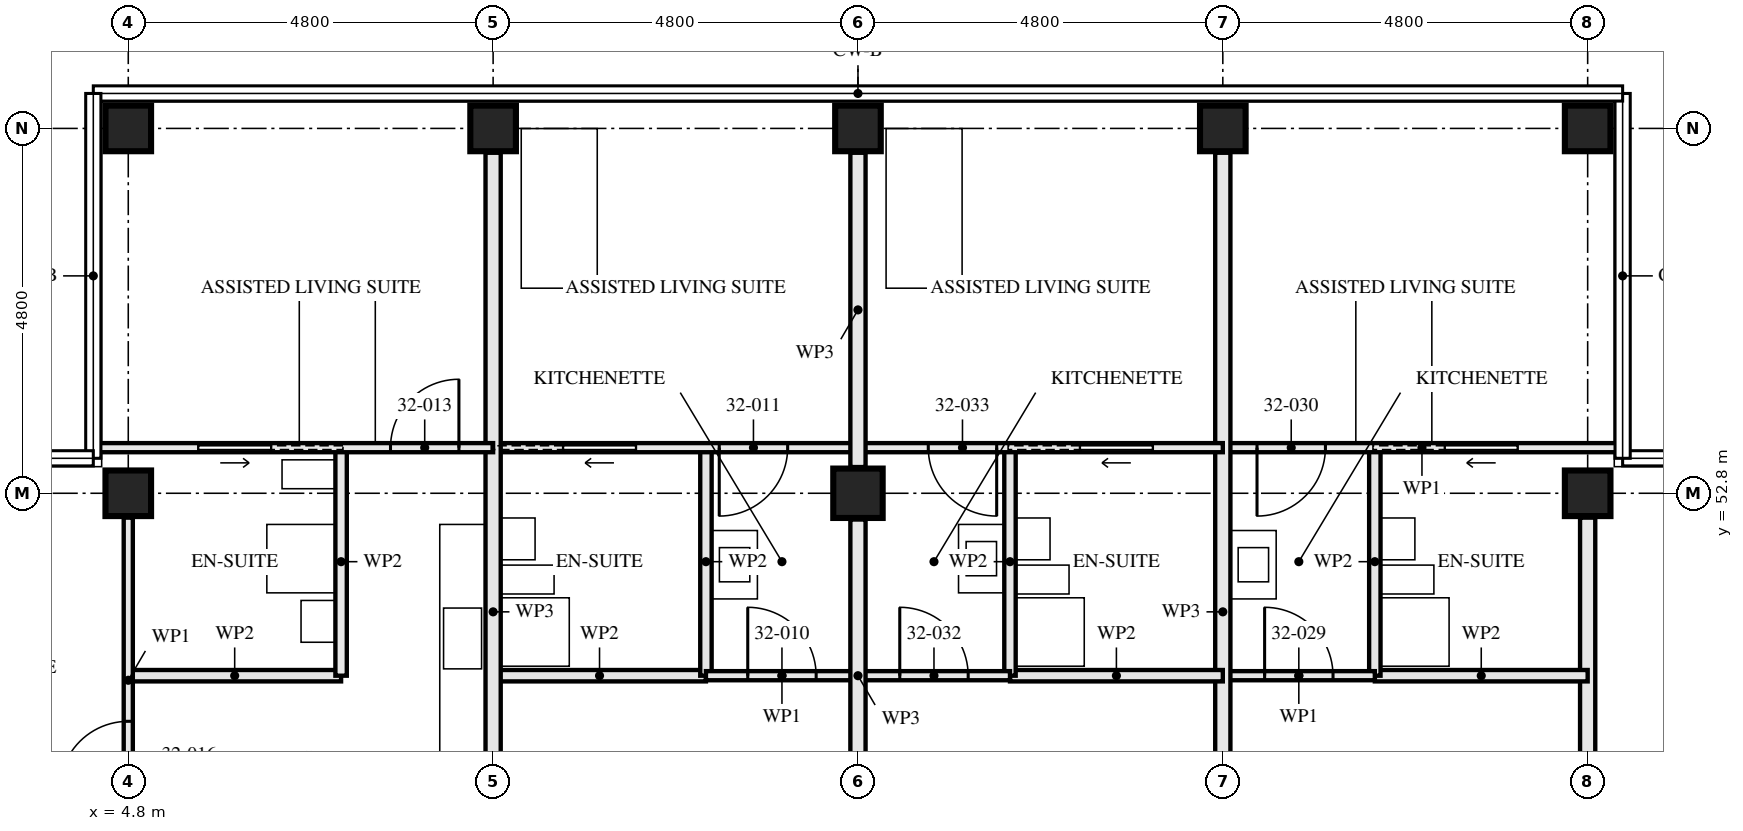
"""IFC4 building model, lengths in metres.
Left out: names, types, materials, properties, quantities, classifications, styles, units other than length and angle.
Written with IfcOpenShell. Run it as: python <this file> out.ifc"""

import sys

from ifc_helpers import new_model, si_unit, direction, frame, frame_2d, origin, origin_2d, place, context, subcontext, project, spatial, rectangle, hollow_rectangle, extrude, element, fill, save


model = new_model("IFC4")
c1 = context("Model", 3, precision=1e-05, world=origin(), true_north=direction((0.0, 1.0)))
c2 = subcontext(c1, "Body", "Model", "MODEL_VIEW")
j1 = project(units=[si_unit("LENGTHUNIT", "METRE"), si_unit("PLANEANGLEUNIT", "RADIAN")], contexts=[c1])
p1 = place(None, origin())
s1 = spatial("IfcSite", under=j1, at=p1, CompositionType="ELEMENT")
p2 = place(p1, origin())
s2 = spatial("IfcBuilding", under=s1, at=p2, CompositionType="ELEMENT")
p3 = place(p2, frame((0.0, 0.0, 119.0)))
s3 = spatial("IfcBuildingStorey", under=s2, at=p3, CompositionType="ELEMENT", Elevation=119.0)
for number, where, z_axis, x_axis in (
    (1, (4.8, 52.8, 0.0), (0.0, 0.0, 1.0), (0.0, 1.0, 0.0)),
    (2, (4.8, 57.6, 0.0), (0.0, 0.0, 1.0), (0.0, 1.0, 0.0)),
    (3, (9.6, 57.6, 0.0), (0.0, 0.0, 1.0), (0.0, 1.0, 0.0)),
):
    element("IfcColumn", number, at=place(p3, frame(where, z_axis=z_axis, x_axis=x_axis)), inside=s3, PredefinedType="COLUMN", context=c2, shape_type="SweptSolid", body=[
        extrude(hollow_rectangle(XDim=0.6, YDim=0.6, WallThickness=0.08, at=origin_2d()), origin(), (0.0, 0.0, 1.0), 3.5),
    ])
p4 = place(p3, frame((14.4, 52.8, 0.0), z_axis=(0.0, 0.0, 1.0), x_axis=(1.0, 0.0, 0.0)))
e4 = element("IfcColumn", 4, at=p4, inside=s3, PredefinedType="COLUMN", context=c2, shape_type="SweptSolid", body=[
    extrude(hollow_rectangle(XDim=0.65, YDim=0.65, WallThickness=0.05, at=origin_2d()), origin(), (0.0, 0.0, 1.0), 3.5),
])
for number, where, z_axis, x_axis in (
    (5, (14.4, 57.6, 0.0), (0.0, 0.0, 1.0), (0.0, 1.0, 0.0)),
    (6, (19.2, 57.6, 0.0), (0.0, 0.0, 1.0), (0.0, 1.0, 0.0)),
    (7, (24.0, 52.8, 0.0), (0.0, 0.0, 1.0), (0.0, 1.0, 0.0)),
    (8, (24.0, 57.6, 0.0), (0.0, 0.0, 1.0), (0.0, 1.0, 0.0)),
):
    element("IfcColumn", number, at=place(p3, frame(where, z_axis=z_axis, x_axis=x_axis)), inside=s3, PredefinedType="COLUMN", context=c2, shape_type="SweptSolid", body=[
        extrude(hollow_rectangle(XDim=0.6, YDim=0.6, WallThickness=0.08, at=origin_2d()), origin(), (0.0, 0.0, 1.0), 3.5),
    ])
p5 = place(p3, frame((12.4, 53.4, 0.0), z_axis=(0.0, 0.0, 1.0), x_axis=(0.0, -1.0, 0.0)))
e9 = element("IfcWall", 9, at=p5, inside=s3, PredefinedType="PARTITIONING", context=c2, shape_type="SweptSolid", body=[
    extrude(rectangle(XDim=3.0, YDim=0.15, at=frame_2d((1.5, 0.0))), origin(), (0.0, 0.0, 1.0), 2.55),
])
p6 = place(p3, frame((12.4, 50.4, 0.0), z_axis=(0.0, 0.0, 1.0), x_axis=(-1.0, 0.0, 0.0)))
e10 = element("IfcWall", 10, at=p6, inside=s3, PredefinedType="PARTITIONING", context=c2, shape_type="SweptSolid", body=[
    extrude(rectangle(XDim=2.8, YDim=0.15, at=frame_2d((1.4, 0.0))), origin(), (0.0, 0.0, 1.0), 3.33),
])
p7 = place(p3, frame((14.4, 50.4, 0.0), z_axis=(0.0, 0.0, 1.0), x_axis=(-1.0, 0.0, 0.0)))
e11 = element("IfcWall", 11, at=p7, inside=s3, PredefinedType="PARTITIONING", context=c2, shape_type="SweptSolid", body=[
    extrude(rectangle(XDim=2.0, YDim=0.12, at=frame_2d((1.0, 0.0))), origin(), (0.0, 0.0, 1.0), 3.33),
])
p8 = place(p7, frame((0.55, 0.0, 0.0)))
e12 = element("IfcOpeningElement", 12, at=p8, cuts=e11, PredefinedType="OPENING", context=c2, shape_type="SweptSolid", body=[
    extrude(rectangle(XDim=0.9, YDim=2.1, at=frame_2d((0.45, 1.05))), frame((0.0, 0.071, 0.0), z_axis=(0.0, -1.0, 0.0), x_axis=(1.0, 0.0, 0.0)), (0.0, 0.0, 1.0), 0.141),
])
p9 = place(p3, frame((14.4, 53.4, 0.0), z_axis=(0.0, 0.0, 1.0), x_axis=(-1.0, 0.0, 0.0)))
e13 = element("IfcWall", 13, at=p9, inside=s3, PredefinedType="PARTITIONING", context=c2, shape_type="SweptSolid", body=[
    extrude(rectangle(XDim=4.8, YDim=0.12, at=frame_2d((2.4, 0.0))), origin(), (0.0, 0.0, 1.0), 3.33),
])
p10 = place(p9, frame((0.925, 0.0, 0.0)))
e14 = element("IfcOpeningElement", 14, at=p10, cuts=e13, PredefinedType="OPENING", context=c2, shape_type="SweptSolid", body=[
    extrude(rectangle(XDim=0.9, YDim=2.1, at=frame_2d((0.45, 1.05))), frame((0.0, 0.071, 0.0), z_axis=(0.0, -1.0, 0.0), x_axis=(1.0, 0.0, 0.0)), (0.0, 0.0, 1.0), 0.141),
])
p11 = place(p9, frame((2.925, 0.0, 0.0)))
e15 = element("IfcOpeningElement", 15, at=p11, cuts=e13, PredefinedType="OPENING", context=c2, shape_type="SweptSolid", body=[
    extrude(rectangle(XDim=0.95, YDim=2.1, at=frame_2d((0.475, 1.05))), frame((0.0, 0.071, 0.0), z_axis=(0.0, -1.0, 0.0), x_axis=(1.0, 0.0, 0.0)), (0.0, 0.0, 1.0), 0.141),
])
p12 = place(p3, frame((9.6, 57.28, 0.0), z_axis=(0.0, 0.0, 1.0), x_axis=(0.0, -1.0, 0.0)))
e16 = element("IfcWall", 16, at=p12, inside=s3, PredefinedType="PARTITIONING", context=c2, shape_type="SweptSolid", body=[
    extrude(rectangle(XDim=12.08, YDim=0.2, at=frame_2d((6.04, 0.0))), origin(), (0.0, 0.0, 1.0), 2.55),
])
p13 = place(p3, frame((7.6, 53.4, 0.0), z_axis=(0.0, 0.0, 1.0), x_axis=(0.0, -1.0, 0.0)))
e17 = element("IfcWall", 17, at=p13, inside=s3, PredefinedType="PARTITIONING", context=c2, shape_type="SweptSolid", body=[
    extrude(rectangle(XDim=3.0, YDim=0.15, at=frame_2d((1.5, 0.0))), origin(), (0.0, 0.0, 1.0), 2.55),
])
p14 = place(p3, frame((7.6, 50.4, 0.0), z_axis=(0.0, 0.0, 1.0), x_axis=(-1.0, 0.0, 0.0)))
e18 = element("IfcWall", 18, at=p14, inside=s3, PredefinedType="PARTITIONING", context=c2, shape_type="SweptSolid", body=[
    extrude(rectangle(XDim=2.8, YDim=0.15, at=frame_2d((1.4, 0.0))), origin(), (0.0, 0.0, 1.0), 3.33),
])
p15 = place(p3, frame((9.6, 53.4, 0.0), z_axis=(0.0, 0.0, 1.0), x_axis=(-1.0, 0.0, 0.0)))
e19 = element("IfcWall", 19, at=p15, inside=s3, PredefinedType="PARTITIONING", context=c2, shape_type="SweptSolid", body=[
    extrude(rectangle(XDim=5.24, YDim=0.12, at=frame_2d((2.62, 0.0))), origin(), (0.0, 0.0, 1.0), 2.32),
])
p16 = place(p15, frame((0.45, 0.0, 0.0)))
e20 = element("IfcOpeningElement", 20, at=p16, cuts=e19, PredefinedType="OPENING", context=c2, shape_type="SweptSolid", body=[
    extrude(rectangle(XDim=0.9, YDim=2.1, at=frame_2d((0.45, 1.05))), frame((0.0, 0.071, 0.0), z_axis=(0.0, -1.0, 0.0), x_axis=(1.0, 0.0, 0.0)), (0.0, 0.0, 1.0), 0.141),
])
p17 = place(p15, frame((2.925, 0.0, 0.0)))
e21 = element("IfcOpeningElement", 21, at=p17, cuts=e19, PredefinedType="OPENING", context=c2, shape_type="SweptSolid", body=[
    extrude(rectangle(XDim=0.95, YDim=2.1, at=frame_2d((0.475, 1.05))), frame((0.0, 0.071, 0.0), z_axis=(0.0, -1.0, 0.0), x_axis=(1.0, 0.0, 0.0)), (0.0, 0.0, 1.0), 0.141),
])
p18 = place(p3, frame((4.8, 52.48, 0.0), z_axis=(0.0, 0.0, 1.0), x_axis=(0.0, -1.0, 0.0)))
e22 = element("IfcWall", 22, at=p18, inside=s3, PredefinedType="PARTITIONING", context=c2, shape_type="SweptSolid", body=[
    extrude(rectangle(XDim=4.28, YDim=0.12, at=frame_2d((2.14, 0.0))), origin(), (0.0, 0.0, 1.0), 3.33),
])
p19 = place(p18, frame((2.68, 0.0, 0.0)))
e23 = element("IfcOpeningElement", 23, at=p19, cuts=e22, PredefinedType="OPENING", context=c2, shape_type="SweptSolid", body=[
    extrude(rectangle(XDim=0.9, YDim=2.1, at=frame_2d((0.45, 1.05))), frame((0.0, 0.071, 0.0), z_axis=(0.0, -1.0, 0.0), x_axis=(1.0, 0.0, 0.0)), (0.0, 0.0, 1.0), 0.141),
])
p20 = place(p3, frame((24.0, 52.48, 0.0), z_axis=(0.0, 0.0, 1.0), x_axis=(0.0, -1.0, 0.0)))
e24 = element("IfcWall", 24, at=p20, inside=s3, PredefinedType="PARTITIONING", context=c2, shape_type="SweptSolid", body=[
    extrude(rectangle(XDim=7.28, YDim=0.2, at=frame_2d((3.64, 0.0))), origin(), (0.0, 0.0, 1.0), 2.55),
])
p21 = place(p3, frame((21.2, 53.4, 0.0), z_axis=(0.0, 0.0, 1.0), x_axis=(0.0, -1.0, 0.0)))
e25 = element("IfcWall", 25, at=p21, inside=s3, PredefinedType="PARTITIONING", context=c2, shape_type="SweptSolid", body=[
    extrude(rectangle(XDim=3.0, YDim=0.15, at=frame_2d((1.5, 0.0))), origin(), (0.0, 0.0, 1.0), 2.55),
])
p22 = place(p3, frame((24.0, 50.4, 0.0), z_axis=(0.0, 0.0, 1.0), x_axis=(-1.0, 0.0, 0.0)))
e26 = element("IfcWall", 26, at=p22, inside=s3, PredefinedType="PARTITIONING", context=c2, shape_type="SweptSolid", body=[
    extrude(rectangle(XDim=2.8, YDim=0.15, at=frame_2d((1.4, 0.0))), origin(), (0.0, 0.0, 1.0), 3.33),
])
p23 = place(p3, frame((21.2, 50.4, 0.0), z_axis=(0.0, 0.0, 1.0), x_axis=(-1.0, 0.0, 0.0)))
e27 = element("IfcWall", 27, at=p23, inside=s3, PredefinedType="PARTITIONING", context=c2, shape_type="SweptSolid", body=[
    extrude(rectangle(XDim=2.0, YDim=0.12, at=frame_2d((1.0, 0.0))), origin(), (0.0, 0.0, 1.0), 3.33),
])
p24 = place(p23, frame((0.55, 0.0, 0.0)))
e28 = element("IfcOpeningElement", 28, at=p24, cuts=e27, PredefinedType="OPENING", context=c2, shape_type="SweptSolid", body=[
    extrude(rectangle(XDim=0.9, YDim=2.1, at=frame_2d((0.45, 1.05))), frame((0.0, 0.071, 0.0), z_axis=(0.0, -1.0, 0.0), x_axis=(1.0, 0.0, 0.0)), (0.0, 0.0, 1.0), 0.141),
])
p25 = place(p3, frame((24.44, 53.4, 0.0), z_axis=(0.0, 0.0, 1.0), x_axis=(-1.0, 0.0, 0.0)))
e29 = element("IfcWall", 29, at=p25, inside=s3, PredefinedType="PARTITIONING", context=c2, shape_type="SweptSolid", body=[
    extrude(rectangle(XDim=5.24, YDim=0.12, at=frame_2d((2.62, 0.0))), origin(), (0.0, 0.0, 1.0), 2.32),
])
p26 = place(p25, frame((3.89, 0.0, 0.0)))
e30 = element("IfcOpeningElement", 30, at=p26, cuts=e29, PredefinedType="OPENING", context=c2, shape_type="SweptSolid", body=[
    extrude(rectangle(XDim=0.9, YDim=2.1, at=frame_2d((0.45, 1.05))), frame((0.0, 0.071, 0.0), z_axis=(0.0, -1.0, 0.0), x_axis=(1.0, 0.0, 0.0)), (0.0, 0.0, 1.0), 0.141),
])
p27 = place(p25, frame((1.365, 0.0, 0.0)))
e31 = element("IfcOpeningElement", 31, at=p27, cuts=e29, PredefinedType="OPENING", context=c2, shape_type="SweptSolid", body=[
    extrude(rectangle(XDim=0.95, YDim=2.1, at=frame_2d((0.475, 1.05))), frame((0.0, 0.071, 0.0), z_axis=(0.0, -1.0, 0.0), x_axis=(1.0, 0.0, 0.0)), (0.0, 0.0, 1.0), 0.141),
])
p28 = place(p3, frame((19.2, 57.28, 0.0), z_axis=(0.0, 0.0, 1.0), x_axis=(0.0, -1.0, 0.0)))
e32 = element("IfcWall", 32, at=p28, inside=s3, PredefinedType="PARTITIONING", context=c2, shape_type="SweptSolid", body=[
    extrude(rectangle(XDim=12.08, YDim=0.2, at=frame_2d((6.04, 0.0))), origin(), (0.0, 0.0, 1.0), 2.55),
])
p29 = place(p3, frame((16.4, 53.4, 0.0), z_axis=(0.0, 0.0, 1.0), x_axis=(0.0, -1.0, 0.0)))
e33 = element("IfcWall", 33, at=p29, inside=s3, PredefinedType="PARTITIONING", context=c2, shape_type="SweptSolid", body=[
    extrude(rectangle(XDim=3.0, YDim=0.15, at=frame_2d((1.5, 0.0))), origin(), (0.0, 0.0, 1.0), 2.55),
])
p30 = place(p3, frame((19.2, 50.4, 0.0), z_axis=(0.0, 0.0, 1.0), x_axis=(-1.0, 0.0, 0.0)))
e34 = element("IfcWall", 34, at=p30, inside=s3, PredefinedType="PARTITIONING", context=c2, shape_type="SweptSolid", body=[
    extrude(rectangle(XDim=2.8, YDim=0.15, at=frame_2d((1.4, 0.0))), origin(), (0.0, 0.0, 1.0), 3.33),
])
p31 = place(p3, frame((16.4, 50.4, 0.0), z_axis=(0.0, 0.0, 1.0), x_axis=(-1.0, 0.0, 0.0)))
e35 = element("IfcWall", 35, at=p31, inside=s3, PredefinedType="PARTITIONING", context=c2, shape_type="SweptSolid", body=[
    extrude(rectangle(XDim=2.0, YDim=0.12, at=frame_2d((1.0, 0.0))), origin(), (0.0, 0.0, 1.0), 3.33),
])
p32 = place(p31, frame((0.55, 0.0, 0.0)))
e36 = element("IfcOpeningElement", 36, at=p32, cuts=e35, PredefinedType="OPENING", context=c2, shape_type="SweptSolid", body=[
    extrude(rectangle(XDim=0.9, YDim=2.1, at=frame_2d((0.45, 1.05))), frame((0.0, 0.071, 0.0), z_axis=(0.0, -1.0, 0.0), x_axis=(1.0, 0.0, 0.0)), (0.0, 0.0, 1.0), 0.141),
])
p33 = place(p3, frame((19.2, 53.4, 0.0), z_axis=(0.0, 0.0, 1.0), x_axis=(-1.0, 0.0, 0.0)))
e37 = element("IfcWall", 37, at=p33, inside=s3, PredefinedType="PARTITIONING", context=c2, shape_type="SweptSolid", body=[
    extrude(rectangle(XDim=4.8, YDim=0.12, at=frame_2d((2.4, 0.0))), origin(), (0.0, 0.0, 1.0), 3.33),
])
p34 = place(p33, frame((2.975, 0.0, 0.0)))
e38 = element("IfcOpeningElement", 38, at=p34, cuts=e37, PredefinedType="OPENING", context=c2, shape_type="SweptSolid", body=[
    extrude(rectangle(XDim=0.9, YDim=2.1, at=frame_2d((0.45, 1.05))), frame((0.0, 0.071, 0.0), z_axis=(0.0, -1.0, 0.0), x_axis=(1.0, 0.0, 0.0)), (0.0, 0.0, 1.0), 0.141),
])
p35 = place(p33, frame((0.925, 0.0, 0.0)))
e39 = element("IfcOpeningElement", 39, at=p35, cuts=e37, PredefinedType="OPENING", context=c2, shape_type="SweptSolid", body=[
    extrude(rectangle(XDim=0.95, YDim=2.1, at=frame_2d((0.475, 1.05))), frame((0.0, 0.071, 0.0), z_axis=(0.0, -1.0, 0.0), x_axis=(1.0, 0.0, 0.0)), (0.0, 0.0, 1.0), 0.141),
])
p36 = place(p3, frame((14.4, 48.345, 0.0), z_axis=(0.0, 0.0, 1.0), x_axis=(0.0, 1.0, 0.0)))
e40 = element("IfcWall", 40, at=p36, inside=s3, PredefinedType="PARTITIONING", context=c2, shape_type="SweptSolid", body=[
    extrude(rectangle(XDim=4.11, YDim=0.2, at=frame_2d((2.055, 0.0))), origin(), (0.0, 0.0, 1.0), 2.32),
])
p37 = place(p3, frame((14.4, 53.145, 0.0), z_axis=(0.0, 0.0, 1.0), x_axis=(0.0, 1.0, 0.0)))
e41 = element("IfcWall", 41, at=p37, inside=s3, PredefinedType="PARTITIONING", context=c2, shape_type="SweptSolid", body=[
    extrude(rectangle(XDim=4.135, YDim=0.2, at=frame_2d((2.067, 0.0))), origin(), (0.0, 0.0, 1.0), 2.32),
])
p38 = place(p8, frame((0.9, 0.0, 0.0), z_axis=(0.0, 0.0, 1.0), x_axis=(-1.0, 0.0, 0.0)))
e42 = element("IfcDoor", 42, at=p38, inside=s3, OperationType="SINGLE_SWING_RIGHT", PredefinedType="DOOR", context=c2, shape_type="SweptSolid", body=[
    extrude(rectangle(XDim=0.9, YDim=2.1, at=frame_2d((0.45, 1.05))), frame((0.0, 0.022, 0.0), z_axis=(0.0, -1.0, 0.0), x_axis=(1.0, 0.0, 0.0)), (0.0, 0.0, 1.0), 0.044),
])
fill(e12, e42)
p39 = place(p10, origin())
e43 = element("IfcDoor", 43, at=p39, inside=s3, OperationType="SINGLE_SWING_LEFT", PredefinedType="DOOR", context=c2, shape_type="SweptSolid", body=[
    extrude(rectangle(XDim=0.9, YDim=2.1, at=frame_2d((0.45, 1.05))), frame((0.0, 0.022, 0.0), z_axis=(0.0, -1.0, 0.0), x_axis=(1.0, 0.0, 0.0)), (0.0, 0.0, 1.0), 0.044),
])
fill(e14, e43)
p40 = place(p11, origin())
e44 = element("IfcDoor", 44, at=p40, inside=s3, OperationType="SLIDING_TO_LEFT", PredefinedType="DOOR", context=c2, shape_type="SweptSolid", body=[
    extrude(rectangle(XDim=0.95, YDim=2.1, at=frame_2d((0.475, 1.05))), frame((0.0, 0.022, 0.0), z_axis=(0.0, -1.0, 0.0), x_axis=(1.0, 0.0, 0.0)), (0.0, 0.0, 1.0), 0.044),
])
fill(e15, e44)
p41 = place(p16, frame((0.9, 0.0, 0.0), z_axis=(0.0, 0.0, 1.0), x_axis=(-1.0, 0.0, 0.0)))
e45 = element("IfcDoor", 45, at=p41, inside=s3, OperationType="SINGLE_SWING_LEFT", PredefinedType="DOOR", context=c2, shape_type="SweptSolid", body=[
    extrude(rectangle(XDim=0.9, YDim=2.1, at=frame_2d((0.45, 1.05))), frame((0.0, 0.022, 0.0), z_axis=(0.0, -1.0, 0.0), x_axis=(1.0, 0.0, 0.0)), (0.0, 0.0, 1.0), 0.044),
])
fill(e20, e45)
p42 = place(p17, origin())
e46 = element("IfcDoor", 46, at=p42, inside=s3, OperationType="SLIDING_TO_RIGHT", PredefinedType="DOOR", context=c2, shape_type="SweptSolid", body=[
    extrude(rectangle(XDim=0.95, YDim=2.1, at=frame_2d((0.475, 1.05))), frame((0.0, 0.022, 0.0), z_axis=(0.0, -1.0, 0.0), x_axis=(1.0, 0.0, 0.0)), (0.0, 0.0, 1.0), 0.044),
])
fill(e21, e46)
p43 = place(p19, frame((0.9, 0.0, 0.0), z_axis=(0.0, 0.0, 1.0), x_axis=(-1.0, 0.0, 0.0)))
e47 = element("IfcDoor", 47, at=p43, inside=s3, OperationType="SINGLE_SWING_RIGHT", PredefinedType="DOOR", context=c2, shape_type="SweptSolid", body=[
    extrude(rectangle(XDim=0.9, YDim=2.1, at=frame_2d((0.45, 1.05))), frame((0.0, 0.022, 0.0), z_axis=(0.0, -1.0, 0.0), x_axis=(1.0, 0.0, 0.0)), (0.0, 0.0, 1.0), 0.044),
])
fill(e23, e47)
p44 = place(p24, frame((0.9, 0.0, 0.0), z_axis=(0.0, 0.0, 1.0), x_axis=(-1.0, 0.0, 0.0)))
e48 = element("IfcDoor", 48, at=p44, inside=s3, OperationType="SINGLE_SWING_RIGHT", PredefinedType="DOOR", context=c2, shape_type="SweptSolid", body=[
    extrude(rectangle(XDim=0.9, YDim=2.1, at=frame_2d((0.45, 1.05))), frame((0.0, 0.022, 0.0), z_axis=(0.0, -1.0, 0.0), x_axis=(1.0, 0.0, 0.0)), (0.0, 0.0, 1.0), 0.044),
])
fill(e28, e48)
p45 = place(p26, origin())
e49 = element("IfcDoor", 49, at=p45, inside=s3, OperationType="SINGLE_SWING_LEFT", PredefinedType="DOOR", context=c2, shape_type="SweptSolid", body=[
    extrude(rectangle(XDim=0.9, YDim=2.1, at=frame_2d((0.45, 1.05))), frame((0.0, 0.022, 0.0), z_axis=(0.0, -1.0, 0.0), x_axis=(1.0, 0.0, 0.0)), (0.0, 0.0, 1.0), 0.044),
])
fill(e30, e49)
p46 = place(p27, origin())
e50 = element("IfcDoor", 50, at=p46, inside=s3, OperationType="SLIDING_TO_LEFT", PredefinedType="DOOR", context=c2, shape_type="SweptSolid", body=[
    extrude(rectangle(XDim=0.95, YDim=2.1, at=frame_2d((0.475, 1.05))), frame((0.0, 0.022, 0.0), z_axis=(0.0, -1.0, 0.0), x_axis=(1.0, 0.0, 0.0)), (0.0, 0.0, 1.0), 0.044),
])
fill(e31, e50)
p47 = place(p32, frame((0.9, 0.0, 0.0), z_axis=(0.0, 0.0, 1.0), x_axis=(-1.0, 0.0, 0.0)))
e51 = element("IfcDoor", 51, at=p47, inside=s3, OperationType="SINGLE_SWING_RIGHT", PredefinedType="DOOR", context=c2, shape_type="SweptSolid", body=[
    extrude(rectangle(XDim=0.9, YDim=2.1, at=frame_2d((0.45, 1.05))), frame((0.0, 0.022, 0.0), z_axis=(0.0, -1.0, 0.0), x_axis=(1.0, 0.0, 0.0)), (0.0, 0.0, 1.0), 0.044),
])
fill(e36, e51)
p48 = place(p34, origin())
e52 = element("IfcDoor", 52, at=p48, inside=s3, OperationType="SINGLE_SWING_RIGHT", PredefinedType="DOOR", context=c2, shape_type="SweptSolid", body=[
    extrude(rectangle(XDim=0.9, YDim=2.1, at=frame_2d((0.45, 1.05))), frame((0.0, 0.022, 0.0), z_axis=(0.0, -1.0, 0.0), x_axis=(1.0, 0.0, 0.0)), (0.0, 0.0, 1.0), 0.044),
])
fill(e38, e52)
p49 = place(p35, origin())
e53 = element("IfcDoor", 53, at=p49, inside=s3, OperationType="SLIDING_TO_LEFT", PredefinedType="DOOR", context=c2, shape_type="SweptSolid", body=[
    extrude(rectangle(XDim=0.95, YDim=2.1, at=frame_2d((0.475, 1.05))), frame((0.0, 0.022, 0.0), z_axis=(0.0, -1.0, 0.0), x_axis=(1.0, 0.0, 0.0)), (0.0, 0.0, 1.0), 0.044),
])
fill(e39, e53)
save(model, sys.argv[1])
